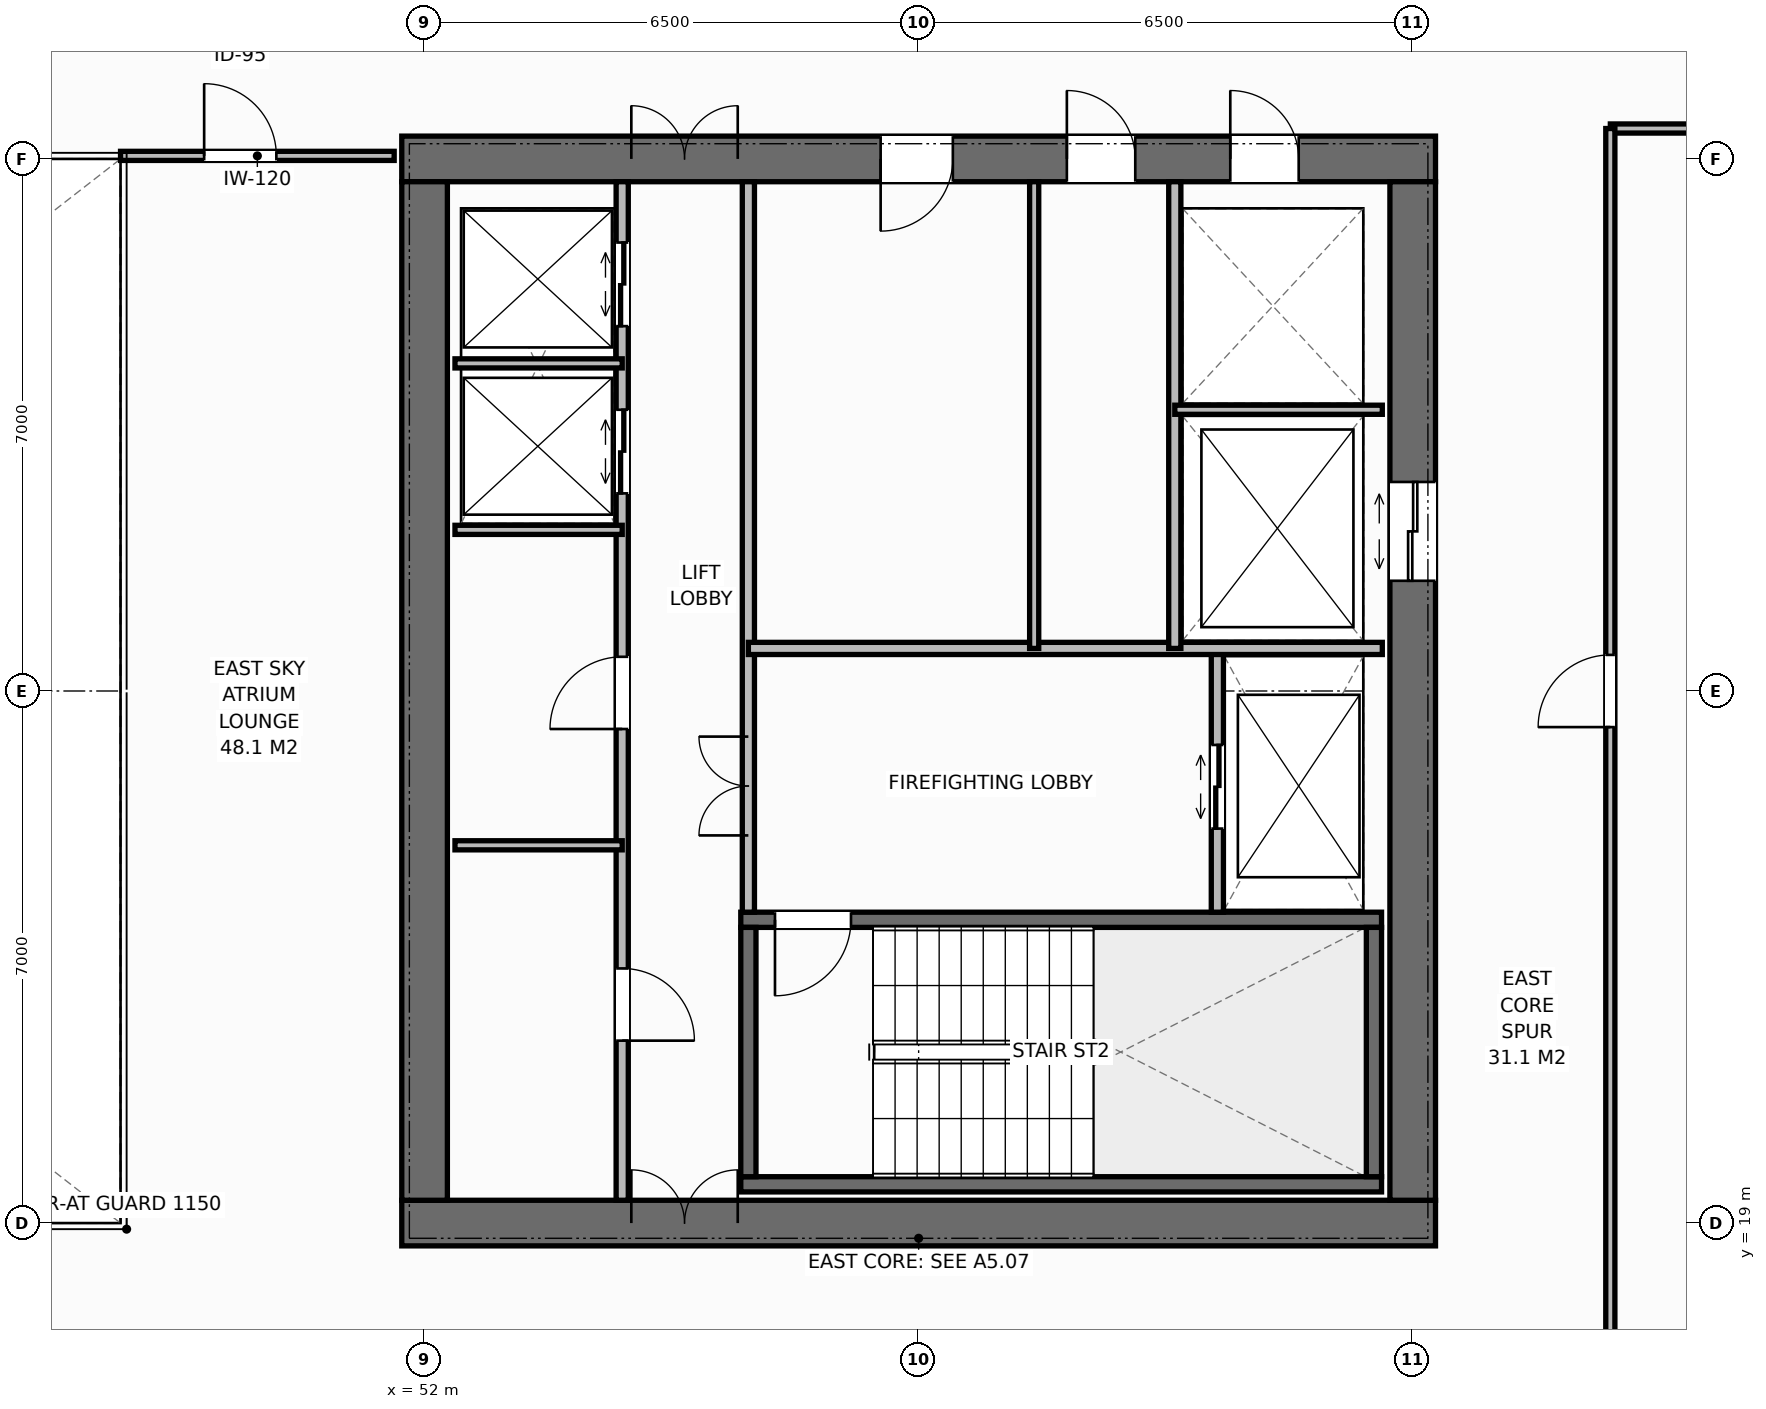
"""IFC4 building model, lengths in metres.
Left out: names, types, materials, properties, quantities, classifications, styles, units other than length and angle.
Written with IfcOpenShell. Run it as: python <this file> out.ifc"""

import sys

from ifc_helpers import new_model, si_unit, direction, frame, frame_2d, origin, place, context, subcontext, project, spatial, rectangle, extrude, element, fill, save


model = new_model("IFC4")
c1 = context("Model", 3, precision=1e-05, world=origin(), true_north=direction((0.0, 1.0)))
c2 = subcontext(c1, "Body", "Model", "MODEL_VIEW")
j1 = project(units=[si_unit("LENGTHUNIT", "METRE"), si_unit("PLANEANGLEUNIT", "RADIAN")], contexts=[c1])
p1 = place(None, origin())
s1 = spatial("IfcSite", under=j1, at=p1, CompositionType="ELEMENT")
p2 = place(p1, origin())
s2 = spatial("IfcBuilding", under=s1, at=p2, CompositionType="ELEMENT")
p3 = place(p2, frame((0.0, 0.0, 193.6)))
s3 = spatial("IfcBuildingStorey", under=s2, at=p3, CompositionType="ELEMENT", Elevation=193.6)
p4 = place(p3, frame((51.7, 19.0, 0.0), z_axis=(0.0, 0.0, 1.0), x_axis=(1.0, 0.0, 0.0)))
e1 = element("IfcWall", 1, at=p4, inside=s3, PredefinedType="SHEAR", context=c2, shape_type="SweptSolid", body=[
    extrude(rectangle(XDim=13.6, YDim=0.6, at=frame_2d((6.8, 0.0))), origin(), (0.0, 0.0, 1.0), 3.8),
])
p5 = place(p4, frame((3.02, 0.0, 0.0)))
e2 = element("IfcOpeningElement", 2, at=p5, cuts=e1, PredefinedType="OPENING", context=c2, shape_type="SweptSolid", body=[
    extrude(rectangle(XDim=1.4, YDim=2.2, at=frame_2d((0.7, 1.1))), frame((0.0, 0.31, 0.0), z_axis=(0.0, -1.0, 0.0), x_axis=(1.0, 0.0, 0.0)), (0.0, 0.0, 1.0), 0.62),
])
p6 = place(p3, frame((51.7, 33.0, 0.0), z_axis=(0.0, 0.0, 1.0), x_axis=(1.0, 0.0, 0.0)))
e3 = element("IfcWall", 3, at=p6, inside=s3, PredefinedType="SHEAR", context=c2, shape_type="SweptSolid", body=[
    extrude(rectangle(XDim=13.6, YDim=0.6, at=frame_2d((6.8, 0.0))), origin(), (0.0, 0.0, 1.0), 3.8),
])
p7 = place(p6, frame((3.02, 0.0, 0.0)))
e4 = element("IfcOpeningElement", 4, at=p7, cuts=e3, PredefinedType="OPENING", context=c2, shape_type="SweptSolid", body=[
    extrude(rectangle(XDim=1.4, YDim=2.2, at=frame_2d((0.7, 1.1))), frame((0.0, 0.31, 0.0), z_axis=(0.0, -1.0, 0.0), x_axis=(1.0, 0.0, 0.0)), (0.0, 0.0, 1.0), 0.62),
])
p8 = place(p6, frame((10.9, 0.0, 0.0)))
e5 = element("IfcOpeningElement", 5, at=p8, cuts=e3, PredefinedType="OPENING", context=c2, shape_type="SweptSolid", body=[
    extrude(rectangle(XDim=0.9, YDim=2.15, at=frame_2d((0.45, 1.075))), frame((0.0, 0.31, 0.0), z_axis=(0.0, -1.0, 0.0), x_axis=(1.0, 0.0, 0.0)), (0.0, 0.0, 1.0), 0.62),
])
p9 = place(p6, frame((6.3, 0.0, 0.0)))
e6 = element("IfcOpeningElement", 6, at=p9, cuts=e3, PredefinedType="OPENING", context=c2, shape_type="SweptSolid", body=[
    extrude(rectangle(XDim=0.95, YDim=2.15, at=frame_2d((0.475, 1.075))), frame((0.0, 0.31, 0.0), z_axis=(0.0, -1.0, 0.0), x_axis=(1.0, 0.0, 0.0)), (0.0, 0.0, 1.0), 0.62),
])
p10 = place(p6, frame((8.75, 0.0, 0.0)))
e7 = element("IfcOpeningElement", 7, at=p10, cuts=e3, PredefinedType="OPENING", context=c2, shape_type="SweptSolid", body=[
    extrude(rectangle(XDim=0.9, YDim=2.15, at=frame_2d((0.45, 1.075))), frame((0.0, 0.31, 0.0), z_axis=(0.0, -1.0, 0.0), x_axis=(1.0, 0.0, 0.0)), (0.0, 0.0, 1.0), 0.62),
])
p11 = place(p3, frame((52.0, 19.3, 0.0), z_axis=(0.0, 0.0, 1.0), x_axis=(0.0, 1.0, 0.0)))
e8 = element("IfcWall", 8, at=p11, inside=s3, PredefinedType="SHEAR", context=c2, shape_type="SweptSolid", body=[
    extrude(rectangle(XDim=13.4, YDim=0.6, at=frame_2d((6.7, 0.0))), origin(), (0.0, 0.0, 1.0), 3.8),
])
p12 = place(p3, frame((65.0, 19.3, 0.0), z_axis=(0.0, 0.0, 1.0), x_axis=(0.0, 1.0, 0.0)))
e9 = element("IfcWall", 9, at=p12, inside=s3, PredefinedType="SHEAR", context=c2, shape_type="SweptSolid", body=[
    extrude(rectangle(XDim=13.4, YDim=0.6, at=frame_2d((6.7, 0.0))), origin(), (0.0, 0.0, 1.0), 3.8),
])
p13 = place(p12, frame((8.15, 0.0, 0.0)))
e10 = element("IfcOpeningElement", 10, at=p13, cuts=e9, PredefinedType="OPENING", context=c2, shape_type="SweptSolid", body=[
    extrude(rectangle(XDim=1.3, YDim=2.2, at=frame_2d((0.65, 1.1))), frame((0.0, 0.31, 0.0), z_axis=(0.0, -1.0, 0.0), x_axis=(1.0, 0.0, 0.0)), (0.0, 0.0, 1.0), 0.62),
])
p14 = place(p3, frame((56.16, 19.51, 0.0), z_axis=(0.0, 0.0, 1.0), x_axis=(1.0, 0.0, 0.0)))
e11 = element("IfcWall", 11, at=p14, inside=s3, PredefinedType="SHEAR", context=c2, shape_type="SweptSolid", body=[
    extrude(rectangle(XDim=8.43, YDim=0.2, at=frame_2d((4.215, 0.0))), origin(), (0.0, 0.0, 1.0), 3.8),
])
p15 = place(p3, frame((56.16, 22.99, 0.0), z_axis=(0.0, 0.0, 1.0), x_axis=(1.0, 0.0, 0.0)))
e12 = element("IfcWall", 12, at=p15, inside=s3, PredefinedType="SHEAR", context=c2, shape_type="SweptSolid", body=[
    extrude(rectangle(XDim=8.43, YDim=0.2, at=frame_2d((4.215, 0.0))), origin(), (0.0, 0.0, 1.0), 3.8),
])
p16 = place(p15, frame((0.45, 0.0, 0.0)))
e13 = element("IfcOpeningElement", 13, at=p16, cuts=e12, PredefinedType="OPENING", context=c2, shape_type="SweptSolid", body=[
    extrude(rectangle(XDim=1.0, YDim=2.15, at=frame_2d((0.5, 1.075))), frame((0.0, 0.11, 0.0), z_axis=(0.0, -1.0, 0.0), x_axis=(1.0, 0.0, 0.0)), (0.0, 0.0, 1.0), 0.22),
])
for number, where, z_axis, x_axis in (
    (14, (56.26, 19.61, 0.0), (0.0, 0.0, 1.0), (0.0, 1.0, 0.0)),
    (15, (64.49, 19.61, 0.0), (0.0, 0.0, 1.0), (0.0, 1.0, 0.0)),
):
    element("IfcWall", number, at=place(p3, frame(where, z_axis=z_axis, x_axis=x_axis)), inside=s3, PredefinedType="SHEAR", context=c2, shape_type="SweptSolid", body=[
        extrude(rectangle(XDim=3.28, YDim=0.2, at=frame_2d((1.64, 0.0))), origin(), (0.0, 0.0, 1.0), 3.8),
    ])
p17 = place(p3, frame((54.6, 19.3, 0.0), z_axis=(0.0, 0.0, 1.0), x_axis=(0.0, 1.0, 0.0)))
e16 = element("IfcWall", 16, at=p17, inside=s3, PredefinedType="STANDARD", context=c2, shape_type="SweptSolid", body=[
    extrude(rectangle(XDim=13.4, YDim=0.16, at=frame_2d((6.7, 0.0))), origin(), (0.0, 0.0, 1.0), 3.52),
])
p18 = place(p17, frame((2.1, 0.0, 0.0)))
e17 = element("IfcOpeningElement", 17, at=p18, cuts=e16, PredefinedType="OPENING", context=c2, shape_type="SweptSolid", body=[
    extrude(rectangle(XDim=0.95, YDim=2.15, at=frame_2d((0.475, 1.075))), frame((0.0, 0.09, 0.0), z_axis=(0.0, -1.0, 0.0), x_axis=(1.0, 0.0, 0.0)), (0.0, 0.0, 1.0), 0.18),
])
p19 = place(p17, frame((6.2, 0.0, 0.0)))
e18 = element("IfcOpeningElement", 18, at=p19, cuts=e16, PredefinedType="OPENING", context=c2, shape_type="SweptSolid", body=[
    extrude(rectangle(XDim=0.95, YDim=2.15, at=frame_2d((0.475, 1.075))), frame((0.0, 0.09, 0.0), z_axis=(0.0, -1.0, 0.0), x_axis=(1.0, 0.0, 0.0)), (0.0, 0.0, 1.0), 0.18),
])
p20 = place(p17, frame((9.3, 0.0, 0.0)))
e19 = element("IfcOpeningElement", 19, at=p20, cuts=e16, PredefinedType="OPENING", context=c2, shape_type="SweptSolid", body=[
    extrude(rectangle(XDim=1.1, YDim=2.2, at=frame_2d((0.55, 1.1))), frame((0.0, 0.09, 0.0), z_axis=(0.0, -1.0, 0.0), x_axis=(1.0, 0.0, 0.0)), (0.0, 0.0, 1.0), 0.18),
])
p21 = place(p17, frame((11.5, 0.0, 0.0)))
e20 = element("IfcOpeningElement", 20, at=p21, cuts=e16, PredefinedType="OPENING", context=c2, shape_type="SweptSolid", body=[
    extrude(rectangle(XDim=1.1, YDim=2.2, at=frame_2d((0.55, 1.1))), frame((0.0, 0.09, 0.0), z_axis=(0.0, -1.0, 0.0), x_axis=(1.0, 0.0, 0.0)), (0.0, 0.0, 1.0), 0.18),
])
p22 = place(p3, frame((56.26, 23.09, 0.0), z_axis=(0.0, 0.0, 1.0), x_axis=(0.0, 1.0, 0.0)))
e21 = element("IfcWall", 21, at=p22, inside=s3, PredefinedType="STANDARD", context=c2, shape_type="SweptSolid", body=[
    extrude(rectangle(XDim=9.61, YDim=0.16, at=frame_2d((4.805, 0.0))), origin(), (0.0, 0.0, 1.0), 3.52),
])
p23 = place(p22, frame((1.01, 0.0, 0.0)))
e22 = element("IfcOpeningElement", 22, at=p23, cuts=e21, PredefinedType="OPENING", context=c2, shape_type="SweptSolid", body=[
    extrude(rectangle(XDim=1.3, YDim=2.2, at=frame_2d((0.65, 1.1))), frame((0.0, 0.09, 0.0), z_axis=(0.0, -1.0, 0.0), x_axis=(1.0, 0.0, 0.0)), (0.0, 0.0, 1.0), 0.18),
])
for number, where, z_axis, x_axis in (
    (23, (52.4, 23.97, 0.0), (0.0, 0.0, 1.0), (1.0, 0.0, 0.0)),
    (24, (52.4, 28.12, 0.0), (0.0, 0.0, 1.0), (1.0, 0.0, 0.0)),
    (25, (52.4, 30.31, 0.0), (0.0, 0.0, 1.0), (1.0, 0.0, 0.0)),
):
    element("IfcWall", number, at=place(p3, frame(where, z_axis=z_axis, x_axis=x_axis)), inside=s3, PredefinedType="PARTITIONING", context=c2, shape_type="SweptSolid", body=[
        extrude(rectangle(XDim=2.2, YDim=0.12, at=frame_2d((1.1, 0.0))), origin(), (0.0, 0.0, 1.0), 3.52),
    ])
p24 = place(p3, frame((62.43, 23.09, 0.0), z_axis=(0.0, 0.0, 1.0), x_axis=(0.0, 1.0, 0.0)))
e26 = element("IfcWall", 26, at=p24, inside=s3, PredefinedType="STANDARD", context=c2, shape_type="SweptSolid", body=[
    extrude(rectangle(XDim=3.47, YDim=0.16, at=frame_2d((1.735, 0.0))), origin(), (0.0, 0.0, 1.0), 3.52),
])
p25 = place(p24, frame((1.1, 0.0, 0.0)))
e27 = element("IfcOpeningElement", 27, at=p25, cuts=e26, PredefinedType="OPENING", context=c2, shape_type="SweptSolid", body=[
    extrude(rectangle(XDim=1.1, YDim=2.2, at=frame_2d((0.55, 1.1))), frame((0.0, 0.09, 0.0), z_axis=(0.0, -1.0, 0.0), x_axis=(1.0, 0.0, 0.0)), (0.0, 0.0, 1.0), 0.18),
])
p26 = place(p3, frame((56.26, 26.56, 0.0), z_axis=(0.0, 0.0, 1.0), x_axis=(1.0, 0.0, 0.0)))
e28 = element("IfcWall", 28, at=p26, inside=s3, PredefinedType="STANDARD", context=c2, shape_type="SweptSolid", body=[
    extrude(rectangle(XDim=8.34, YDim=0.16, at=frame_2d((4.17, 0.0))), origin(), (0.0, 0.0, 1.0), 3.52),
])
p27 = place(p3, frame((61.87, 26.56, 0.0), z_axis=(0.0, 0.0, 1.0), x_axis=(0.0, 1.0, 0.0)))
e29 = element("IfcWall", 29, at=p27, inside=s3, PredefinedType="STANDARD", context=c2, shape_type="SweptSolid", body=[
    extrude(rectangle(XDim=6.14, YDim=0.16, at=frame_2d((3.07, 0.0))), origin(), (0.0, 0.0, 1.0), 3.52),
])
p28 = place(p3, frame((61.87, 29.7, 0.0), z_axis=(0.0, 0.0, 1.0), x_axis=(1.0, 0.0, 0.0)))
e30 = element("IfcWall", 30, at=p28, inside=s3, PredefinedType="PARTITIONING", context=c2, shape_type="SweptSolid", body=[
    extrude(rectangle(XDim=2.73, YDim=0.12, at=frame_2d((1.365, 0.0))), origin(), (0.0, 0.0, 1.0), 3.52),
])
p29 = place(p3, frame((60.02, 26.56, 0.0), z_axis=(0.0, 0.0, 1.0), x_axis=(0.0, 1.0, 0.0)))
e31 = element("IfcWall", 31, at=p29, inside=s3, PredefinedType="PARTITIONING", context=c2, shape_type="SweptSolid", body=[
    extrude(rectangle(XDim=6.14, YDim=0.12, at=frame_2d((3.07, 0.0))), origin(), (0.0, 0.0, 1.0), 3.52),
])
p30 = place(p3, frame((48.0, 33.04, 0.0), z_axis=(0.0, 0.0, 1.0), x_axis=(1.0, 0.0, 0.0)))
e32 = element("IfcWall", 32, at=p30, inside=s3, PredefinedType="PARTITIONING", context=c2, shape_type="SweptSolid", body=[
    extrude(rectangle(XDim=3.6, YDim=0.12, at=frame_2d((1.8, 0.0))), origin(), (0.0, 0.0, 1.0), 3.26),
])
p31 = place(p30, frame((1.1, 0.0, 0.0)))
e33 = element("IfcOpeningElement", 33, at=p31, cuts=e32, PredefinedType="OPENING", context=c2, shape_type="SweptSolid", body=[
    extrude(rectangle(XDim=0.95, YDim=2.15, at=frame_2d((0.475, 1.075))), frame((0.0, 0.07, 0.0), z_axis=(0.0, -1.0, 0.0), x_axis=(1.0, 0.0, 0.0)), (0.0, 0.0, 1.0), 0.14),
])
p32 = place(p3, frame((67.6, 33.4, 0.0), z_axis=(0.0, 0.0, 1.0), x_axis=(1.0, 0.0, 0.0)))
e34 = element("IfcWall", 34, at=p32, inside=s3, PredefinedType="PARTITIONING", context=c2, shape_type="SweptSolid", body=[
    extrude(rectangle(XDim=6.58, YDim=0.12, at=frame_2d((3.29, 0.0))), origin(), (0.0, 0.0, 1.0), 3.52),
])
p33 = place(p3, frame((67.6, 16.5, 0.0), z_axis=(0.0, 0.0, 1.0), x_axis=(0.0, 1.0, 0.0)))
e35 = element("IfcWall", 35, at=p33, inside=s3, PredefinedType="PARTITIONING", context=c2, shape_type="SweptSolid", body=[
    extrude(rectangle(XDim=16.9, YDim=0.12, at=frame_2d((8.45, 0.0))), origin(), (0.0, 0.0, 1.0), 3.52),
])
p34 = place(p33, frame((9.025, 0.0, 0.0)))
e36 = element("IfcOpeningElement", 36, at=p34, cuts=e35, PredefinedType="OPENING", context=c2, shape_type="SweptSolid", body=[
    extrude(rectangle(XDim=0.95, YDim=2.15, at=frame_2d((0.475, 1.075))), frame((0.0, 0.07, 0.0), z_axis=(0.0, -1.0, 0.0), x_axis=(1.0, 0.0, 0.0)), (0.0, 0.0, 1.0), 0.14),
])
p35 = place(p5, origin())
e37 = element("IfcDoor", 37, at=p35, inside=s3, OperationType="DOUBLE_DOOR_SINGLE_SWING", PredefinedType="DOOR", context=c2, shape_type="SweptSolid", body=[
    extrude(rectangle(XDim=1.4, YDim=2.2, at=frame_2d((0.7, 1.1))), frame((0.0, 0.075, 0.0), z_axis=(0.0, -1.0, 0.0), x_axis=(1.0, 0.0, 0.0)), (0.0, 0.0, 1.0), 0.05),
])
fill(e2, e37)
p36 = place(p7, origin())
e38 = element("IfcDoor", 38, at=p36, inside=s3, OperationType="DOUBLE_DOOR_SINGLE_SWING", PredefinedType="DOOR", context=c2, shape_type="SweptSolid", body=[
    extrude(rectangle(XDim=1.4, YDim=2.2, at=frame_2d((0.7, 1.1))), frame((0.0, -0.025, 0.0), z_axis=(0.0, -1.0, 0.0), x_axis=(1.0, 0.0, 0.0)), (0.0, 0.0, 1.0), 0.05),
])
fill(e4, e38)
p37 = place(p18, origin())
e39 = element("IfcDoor", 39, at=p37, inside=s3, OperationType="SINGLE_SWING_RIGHT", PredefinedType="DOOR", context=c2, shape_type="SweptSolid", body=[
    extrude(rectangle(XDim=0.95, YDim=2.15, at=frame_2d((0.475, 1.075))), frame((0.0, 0.025, 0.0), z_axis=(0.0, -1.0, 0.0), x_axis=(1.0, 0.0, 0.0)), (0.0, 0.0, 1.0), 0.05),
])
fill(e17, e39)
p38 = place(p19, origin())
e40 = element("IfcDoor", 40, at=p38, inside=s3, OperationType="SINGLE_SWING_LEFT", PredefinedType="DOOR", context=c2, shape_type="SweptSolid", body=[
    extrude(rectangle(XDim=0.95, YDim=2.15, at=frame_2d((0.475, 1.075))), frame((0.0, 0.025, 0.0), z_axis=(0.0, -1.0, 0.0), x_axis=(1.0, 0.0, 0.0)), (0.0, 0.0, 1.0), 0.05),
])
fill(e18, e40)
p39 = place(p20, origin())
e41 = element("IfcDoor", 41, at=p39, inside=s3, OperationType="DOUBLE_DOOR_SLIDING", PredefinedType="DOOR", context=c2, shape_type="SweptSolid", body=[
    extrude(rectangle(XDim=1.1, YDim=2.2, at=frame_2d((0.55, 1.1))), frame((0.0, 0.025, 0.0), z_axis=(0.0, -1.0, 0.0), x_axis=(1.0, 0.0, 0.0)), (0.0, 0.0, 1.0), 0.05),
])
fill(e19, e41)
p40 = place(p21, origin())
e42 = element("IfcDoor", 42, at=p40, inside=s3, OperationType="DOUBLE_DOOR_SLIDING", PredefinedType="DOOR", context=c2, shape_type="SweptSolid", body=[
    extrude(rectangle(XDim=1.1, YDim=2.2, at=frame_2d((0.55, 1.1))), frame((0.0, 0.025, 0.0), z_axis=(0.0, -1.0, 0.0), x_axis=(1.0, 0.0, 0.0)), (0.0, 0.0, 1.0), 0.05),
])
fill(e20, e42)
p41 = place(p16, origin())
e43 = element("IfcDoor", 43, at=p41, inside=s3, OperationType="SINGLE_SWING_RIGHT", PredefinedType="DOOR", context=c2, shape_type="SweptSolid", body=[
    extrude(rectangle(XDim=1.0, YDim=2.15, at=frame_2d((0.5, 1.075))), frame((0.0, 0.025, 0.0), z_axis=(0.0, -1.0, 0.0), x_axis=(1.0, 0.0, 0.0)), (0.0, 0.0, 1.0), 0.05),
])
fill(e13, e43)
p42 = place(p25, origin())
e44 = element("IfcDoor", 44, at=p42, inside=s3, OperationType="DOUBLE_DOOR_SLIDING", PredefinedType="DOOR", context=c2, shape_type="SweptSolid", body=[
    extrude(rectangle(XDim=1.1, YDim=2.2, at=frame_2d((0.55, 1.1))), frame((0.0, 0.025, 0.0), z_axis=(0.0, -1.0, 0.0), x_axis=(1.0, 0.0, 0.0)), (0.0, 0.0, 1.0), 0.05),
])
fill(e27, e44)
p43 = place(p23, origin())
e45 = element("IfcDoor", 45, at=p43, inside=s3, OperationType="DOUBLE_DOOR_SINGLE_SWING", PredefinedType="DOOR", context=c2, shape_type="SweptSolid", body=[
    extrude(rectangle(XDim=1.3, YDim=2.2, at=frame_2d((0.65, 1.1))), frame((0.0, 0.025, 0.0), z_axis=(0.0, -1.0, 0.0), x_axis=(1.0, 0.0, 0.0)), (0.0, 0.0, 1.0), 0.05),
])
fill(e22, e45)
p44 = place(p13, origin())
e46 = element("IfcDoor", 46, at=p44, inside=s3, OperationType="DOUBLE_DOOR_SLIDING", PredefinedType="DOOR", context=c2, shape_type="SweptSolid", body=[
    extrude(rectangle(XDim=1.3, YDim=2.2, at=frame_2d((0.65, 1.1))), frame((0.0, 0.025, 0.0), z_axis=(0.0, -1.0, 0.0), x_axis=(1.0, 0.0, 0.0)), (0.0, 0.0, 1.0), 0.05),
])
fill(e10, e46)
p45 = place(p8, origin())
e47 = element("IfcDoor", 47, at=p45, inside=s3, OperationType="SINGLE_SWING_LEFT", PredefinedType="DOOR", context=c2, shape_type="SweptSolid", body=[
    extrude(rectangle(XDim=0.9, YDim=2.15, at=frame_2d((0.45, 1.075))), frame((0.0, -0.025, 0.0), z_axis=(0.0, -1.0, 0.0), x_axis=(1.0, 0.0, 0.0)), (0.0, 0.0, 1.0), 0.05),
])
fill(e5, e47)
p46 = place(p9, origin())
e48 = element("IfcDoor", 48, at=p46, inside=s3, OperationType="SINGLE_SWING_RIGHT", PredefinedType="DOOR", context=c2, shape_type="SweptSolid", body=[
    extrude(rectangle(XDim=0.95, YDim=2.15, at=frame_2d((0.475, 1.075))), frame((0.0, -0.025, 0.0), z_axis=(0.0, -1.0, 0.0), x_axis=(1.0, 0.0, 0.0)), (0.0, 0.0, 1.0), 0.05),
])
fill(e6, e48)
p47 = place(p10, origin())
e49 = element("IfcDoor", 49, at=p47, inside=s3, OperationType="SINGLE_SWING_LEFT", PredefinedType="DOOR", context=c2, shape_type="SweptSolid", body=[
    extrude(rectangle(XDim=0.9, YDim=2.15, at=frame_2d((0.45, 1.075))), frame((0.0, -0.025, 0.0), z_axis=(0.0, -1.0, 0.0), x_axis=(1.0, 0.0, 0.0)), (0.0, 0.0, 1.0), 0.05),
])
fill(e7, e49)
p48 = place(p31, origin())
e50 = element("IfcDoor", 50, at=p48, inside=s3, OperationType="SINGLE_SWING_LEFT", PredefinedType="DOOR", context=c2, shape_type="SweptSolid", body=[
    extrude(rectangle(XDim=0.95, YDim=2.15, at=frame_2d((0.475, 1.075))), frame((0.0, 0.025, 0.0), z_axis=(0.0, -1.0, 0.0), x_axis=(1.0, 0.0, 0.0)), (0.0, 0.0, 1.0), 0.05),
])
fill(e33, e50)
p49 = place(p34, origin())
e51 = element("IfcDoor", 51, at=p49, inside=s3, OperationType="SINGLE_SWING_LEFT", PredefinedType="DOOR", context=c2, shape_type="SweptSolid", body=[
    extrude(rectangle(XDim=0.95, YDim=2.15, at=frame_2d((0.475, 1.075))), frame((0.0, 0.025, 0.0), z_axis=(0.0, -1.0, 0.0), x_axis=(1.0, 0.0, 0.0)), (0.0, 0.0, 1.0), 0.05),
])
fill(e36, e51)
save(model, sys.argv[1])
